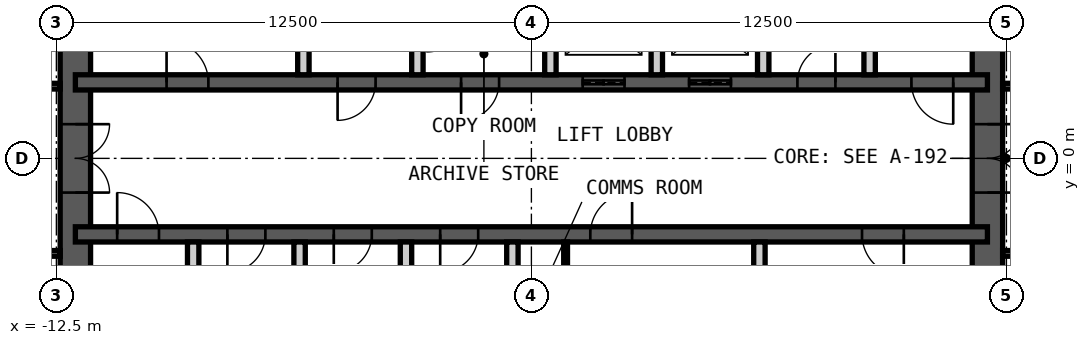
"""IFC4 building model, lengths in metres.
Left out: names, types, materials, properties, quantities, classifications, styles, units other than length and angle.
Written with IfcOpenShell. Run it as: python <this file> out.ifc"""

import sys

from ifc_helpers import new_model, si_unit, direction, frame, frame_2d, origin, place, context, subcontext, project, spatial, rectangle, extrude, element, fill, save


model = new_model("IFC4")
c1 = context("Model", 3, precision=1e-05, world=origin(), true_north=direction((0.0, 1.0)))
c2 = subcontext(c1, "Body", "Model", "MODEL_VIEW")
j1 = project(units=[si_unit("LENGTHUNIT", "METRE"), si_unit("PLANEANGLEUNIT", "RADIAN")], contexts=[c1])
p1 = place(None, origin())
s1 = spatial("IfcSite", under=j1, at=p1, CompositionType="ELEMENT")
p2 = place(p1, origin())
s2 = spatial("IfcBuilding", under=s1, at=p2, CompositionType="ELEMENT")
p3 = place(p2, frame((0.0, 0.0, 312.4)))
s3 = spatial("IfcBuildingStorey", under=s2, at=p3, CompositionType="ELEMENT", Elevation=312.4)
p4 = place(p3, frame((12.0, -9.0, 0.0), z_axis=(0.0, 0.0, 1.0), x_axis=(0.0, 1.0, 0.0)))
e1 = element("IfcWall", 1, at=p4, inside=s3, PredefinedType="SHEAR", context=c2, shape_type="SweptSolid", body=[
    extrude(rectangle(XDim=18.0, YDim=0.8, at=frame_2d((9.0, 0.0))), origin(), (0.0, 0.0, 1.0), 4.2),
])
p5 = place(p4, frame((8.1, 0.0, 0.0)))
e2 = element("IfcOpeningElement", 2, at=p5, cuts=e1, PredefinedType="OPENING", context=c2, shape_type="SweptSolid", body=[
    extrude(rectangle(XDim=1.8, YDim=2.1, at=frame_2d((0.9, 1.05))), frame((0.0, 0.41, 0.0), z_axis=(0.0, -1.0, 0.0), x_axis=(1.0, 0.0, 0.0)), (0.0, 0.0, 1.0), 0.82),
])
p6 = place(p3, frame((-12.0, -9.0, 0.0), z_axis=(0.0, 0.0, 1.0), x_axis=(0.0, 1.0, 0.0)))
e3 = element("IfcWall", 3, at=p6, inside=s3, PredefinedType="SHEAR", context=c2, shape_type="SweptSolid", body=[
    extrude(rectangle(XDim=18.0, YDim=0.8, at=frame_2d((9.0, 0.0))), origin(), (0.0, 0.0, 1.0), 4.2),
])
p7 = place(p6, frame((8.1, 0.0, 0.0)))
e4 = element("IfcOpeningElement", 4, at=p7, cuts=e3, PredefinedType="OPENING", context=c2, shape_type="SweptSolid", body=[
    extrude(rectangle(XDim=1.8, YDim=2.1, at=frame_2d((0.9, 1.05))), frame((0.0, 0.41, 0.0), z_axis=(0.0, -1.0, 0.0), x_axis=(1.0, 0.0, 0.0)), (0.0, 0.0, 1.0), 0.82),
])
p8 = place(p3, frame((-12.0, 2.0, 0.0), z_axis=(0.0, 0.0, 1.0), x_axis=(1.0, 0.0, 0.0)))
e5 = element("IfcWall", 5, at=p8, inside=s3, PredefinedType="SHEAR", context=c2, shape_type="SweptSolid", body=[
    extrude(rectangle(XDim=24.0, YDim=0.4, at=frame_2d((12.0, 0.0))), origin(), (0.0, 0.0, 1.0), 4.2),
])
p9 = place(p8, frame((2.4, 0.0, 0.0)))
e6 = element("IfcOpeningElement", 6, at=p9, cuts=e5, PredefinedType="OPENING", context=c2, shape_type="SweptSolid", body=[
    extrude(rectangle(XDim=1.1, YDim=2.1, at=frame_2d((0.55, 1.05))), frame((0.0, 0.21, 0.0), z_axis=(0.0, -1.0, 0.0), x_axis=(1.0, 0.0, 0.0)), (0.0, 0.0, 1.0), 0.42),
])
p10 = place(p8, frame((22.0, 0.0, 0.0)))
e7 = element("IfcOpeningElement", 7, at=p10, cuts=e5, PredefinedType="OPENING", context=c2, shape_type="SweptSolid", body=[
    extrude(rectangle(XDim=1.1, YDim=2.1, at=frame_2d((0.55, 1.05))), frame((0.0, 0.21, 0.0), z_axis=(0.0, -1.0, 0.0), x_axis=(1.0, 0.0, 0.0)), (0.0, 0.0, 1.0), 0.42),
])
p11 = place(p8, frame((10.15, 0.0, 0.0)))
e8 = element("IfcOpeningElement", 8, at=p11, cuts=e5, PredefinedType="OPENING", context=c2, shape_type="SweptSolid", body=[
    extrude(rectangle(XDim=1.0, YDim=2.1, at=frame_2d((0.5, 1.05))), frame((0.0, 0.21, 0.0), z_axis=(0.0, -1.0, 0.0), x_axis=(1.0, 0.0, 0.0)), (0.0, 0.0, 1.0), 0.42),
])
p12 = place(p8, frame((6.9, 0.0, 0.0)))
e9 = element("IfcOpeningElement", 9, at=p12, cuts=e5, PredefinedType="OPENING", context=c2, shape_type="SweptSolid", body=[
    extrude(rectangle(XDim=1.0, YDim=2.1, at=frame_2d((0.5, 1.05))), frame((0.0, 0.21, 0.0), z_axis=(0.0, -1.0, 0.0), x_axis=(1.0, 0.0, 0.0)), (0.0, 0.0, 1.0), 0.42),
])
p13 = place(p8, frame((13.35, 0.0, 0.0)))
e10 = element("IfcOpeningElement", 10, at=p13, cuts=e5, PredefinedType="OPENING", context=c2, shape_type="SweptSolid", body=[
    extrude(rectangle(XDim=1.1, YDim=2.4, at=frame_2d((0.55, 1.2))), frame((0.0, 0.21, 0.0), z_axis=(0.0, -1.0, 0.0), x_axis=(1.0, 0.0, 0.0)), (0.0, 0.0, 1.0), 0.42),
])
p14 = place(p8, frame((16.15, 0.0, 0.0)))
e11 = element("IfcOpeningElement", 11, at=p14, cuts=e5, PredefinedType="OPENING", context=c2, shape_type="SweptSolid", body=[
    extrude(rectangle(XDim=1.1, YDim=2.4, at=frame_2d((0.55, 1.2))), frame((0.0, 0.21, 0.0), z_axis=(0.0, -1.0, 0.0), x_axis=(1.0, 0.0, 0.0)), (0.0, 0.0, 1.0), 0.42),
])
p15 = place(p8, frame((19.0, 0.0, 0.0)))
e12 = element("IfcOpeningElement", 12, at=p15, cuts=e5, PredefinedType="OPENING", context=c2, shape_type="SweptSolid", body=[
    extrude(rectangle(XDim=1.0, YDim=2.1, at=frame_2d((0.5, 1.05))), frame((0.0, 0.21, 0.0), z_axis=(0.0, -1.0, 0.0), x_axis=(1.0, 0.0, 0.0)), (0.0, 0.0, 1.0), 0.42),
])
p16 = place(p3, frame((-12.0, -2.0, 0.0), z_axis=(0.0, 0.0, 1.0), x_axis=(1.0, 0.0, 0.0)))
e13 = element("IfcWall", 13, at=p16, inside=s3, PredefinedType="SHEAR", context=c2, shape_type="SweptSolid", body=[
    extrude(rectangle(XDim=24.0, YDim=0.4, at=frame_2d((12.0, 0.0))), origin(), (0.0, 0.0, 1.0), 4.2),
])
p17 = place(p16, frame((1.1, 0.0, 0.0)))
e14 = element("IfcOpeningElement", 14, at=p17, cuts=e13, PredefinedType="OPENING", context=c2, shape_type="SweptSolid", body=[
    extrude(rectangle(XDim=1.1, YDim=2.1, at=frame_2d((0.55, 1.05))), frame((0.0, 0.21, 0.0), z_axis=(0.0, -1.0, 0.0), x_axis=(1.0, 0.0, 0.0)), (0.0, 0.0, 1.0), 0.42),
])
p18 = place(p16, frame((13.55, 0.0, 0.0)))
e15 = element("IfcOpeningElement", 15, at=p18, cuts=e13, PredefinedType="OPENING", context=c2, shape_type="SweptSolid", body=[
    extrude(rectangle(XDim=1.1, YDim=2.1, at=frame_2d((0.55, 1.05))), frame((0.0, 0.21, 0.0), z_axis=(0.0, -1.0, 0.0), x_axis=(1.0, 0.0, 0.0)), (0.0, 0.0, 1.0), 0.42),
])
p19 = place(p16, frame((20.7, 0.0, 0.0)))
e16 = element("IfcOpeningElement", 16, at=p19, cuts=e13, PredefinedType="OPENING", context=c2, shape_type="SweptSolid", body=[
    extrude(rectangle(XDim=1.1, YDim=2.1, at=frame_2d((0.55, 1.05))), frame((0.0, 0.21, 0.0), z_axis=(0.0, -1.0, 0.0), x_axis=(1.0, 0.0, 0.0)), (0.0, 0.0, 1.0), 0.42),
])
p20 = place(p16, frame((4.0, 0.0, 0.0)))
e17 = element("IfcOpeningElement", 17, at=p20, cuts=e13, PredefinedType="OPENING", context=c2, shape_type="SweptSolid", body=[
    extrude(rectangle(XDim=1.0, YDim=2.1, at=frame_2d((0.5, 1.05))), frame((0.0, 0.21, 0.0), z_axis=(0.0, -1.0, 0.0), x_axis=(1.0, 0.0, 0.0)), (0.0, 0.0, 1.0), 0.42),
])
p21 = place(p16, frame((6.8, 0.0, 0.0)))
e18 = element("IfcOpeningElement", 18, at=p21, cuts=e13, PredefinedType="OPENING", context=c2, shape_type="SweptSolid", body=[
    extrude(rectangle(XDim=1.0, YDim=2.1, at=frame_2d((0.5, 1.05))), frame((0.0, 0.21, 0.0), z_axis=(0.0, -1.0, 0.0), x_axis=(1.0, 0.0, 0.0)), (0.0, 0.0, 1.0), 0.42),
])
p22 = place(p16, frame((9.6, 0.0, 0.0)))
e19 = element("IfcOpeningElement", 19, at=p22, cuts=e13, PredefinedType="OPENING", context=c2, shape_type="SweptSolid", body=[
    extrude(rectangle(XDim=1.0, YDim=2.1, at=frame_2d((0.5, 1.05))), frame((0.0, 0.21, 0.0), z_axis=(0.0, -1.0, 0.0), x_axis=(1.0, 0.0, 0.0)), (0.0, 0.0, 1.0), 0.42),
])
for number, where, z_axis, x_axis in (
    (20, (-6.0, 2.2, 0.0), (0.0, 0.0, 1.0), (0.0, 1.0, 0.0)),
    (21, (-3.0, 2.2, 0.0), (0.0, 0.0, 1.0), (0.0, 1.0, 0.0)),
    (22, (0.5, 2.2, 0.0), (0.0, 0.0, 1.0), (0.0, 1.0, 0.0)),
    (23, (3.3, 2.2, 0.0), (0.0, 0.0, 1.0), (0.0, 1.0, 0.0)),
    (24, (6.1, 2.2, 0.0), (0.0, 0.0, 1.0), (0.0, 1.0, 0.0)),
    (25, (8.9, 2.2, 0.0), (0.0, 0.0, 1.0), (0.0, 1.0, 0.0)),
    (26, (-8.9, -4.85, 0.0), (0.0, 0.0, 1.0), (0.0, 1.0, 0.0)),
    (27, (-6.1, -4.85, 0.0), (0.0, 0.0, 1.0), (0.0, 1.0, 0.0)),
    (28, (-3.3, -4.85, 0.0), (0.0, 0.0, 1.0), (0.0, 1.0, 0.0)),
    (29, (-0.5, -4.85, 0.0), (0.0, 0.0, 1.0), (0.0, 1.0, 0.0)),
    (30, (6.0, -4.85, 0.0), (0.0, 0.0, 1.0), (0.0, 1.0, 0.0)),
):
    element("IfcWall", number, at=place(p3, frame(where, z_axis=z_axis, x_axis=x_axis)), inside=s3, PredefinedType="PARTITIONING", context=c2, shape_type="SweptSolid", body=[
        extrude(rectangle(XDim=2.65, YDim=0.3, at=frame_2d((1.325, 0.0))), origin(), (0.0, 0.0, 1.0), 3.98),
    ])
p23 = place(p3, frame((0.9, -4.85, 0.0), z_axis=(0.0, 0.0, 1.0), x_axis=(0.0, 1.0, 0.0)))
e31 = element("IfcWall", 31, at=p23, inside=s3, PredefinedType="PARTITIONING", context=c2, shape_type="SweptSolid", body=[
    extrude(rectangle(XDim=2.65, YDim=0.1, at=frame_2d((1.325, 0.0))), origin(), (0.0, 0.0, 1.0), 3.98),
])
p24 = place(p23, frame((0.1, 0.0, 0.0)))
e32 = element("IfcOpeningElement", 32, at=p24, cuts=e31, PredefinedType="OPENING", context=c2, shape_type="SweptSolid", body=[
    extrude(rectangle(XDim=1.0, YDim=2.4, at=frame_2d((0.5, 1.2))), frame((0.0, 0.06, 0.0), z_axis=(0.0, -1.0, 0.0), x_axis=(1.0, 0.0, 0.0)), (0.0, 0.0, 1.0), 0.12),
])
p25 = place(p3, frame((12.4, 1.9, 0.0), z_axis=(0.0, 0.0, 1.0), x_axis=(1.0, 0.0, 0.0)))
e33 = element("IfcWall", 33, at=p25, inside=s3, PredefinedType="PARTITIONING", context=c2, shape_type="SweptSolid", body=[
    extrude(rectangle(XDim=2.2, YDim=0.15, at=frame_2d((1.1, 0.0))), origin(), (0.0, 0.0, 1.0), 2.93),
])
p26 = place(p3, frame((12.4, -2.5, 0.0), z_axis=(0.0, 0.0, 1.0), x_axis=(1.0, 0.0, 0.0)))
e34 = element("IfcWall", 34, at=p26, inside=s3, PredefinedType="PARTITIONING", context=c2, shape_type="SweptSolid", body=[
    extrude(rectangle(XDim=2.2, YDim=0.15, at=frame_2d((1.1, 0.0))), origin(), (0.0, 0.0, 1.0), 3.33),
])
for number, where, z_axis, x_axis in (
    (35, (-12.4, 1.9, 0.0), (0.0, 0.0, 1.0), (-1.0, 0.0, 0.0)),
    (36, (-12.4, -2.5, 0.0), (0.0, 0.0, 1.0), (-1.0, 0.0, 0.0)),
):
    element("IfcWall", number, at=place(p3, frame(where, z_axis=z_axis, x_axis=x_axis)), inside=s3, PredefinedType="PARTITIONING", context=c2, shape_type="SweptSolid", body=[
        extrude(rectangle(XDim=2.2, YDim=0.15, at=frame_2d((1.1, 0.0))), origin(), (0.0, 0.0, 1.0), 3.53),
    ])
p27 = place(p9, origin())
e37 = element("IfcDoor", 37, at=p27, inside=s3, OperationType="SINGLE_SWING_RIGHT", PredefinedType="DOOR", context=c2, shape_type="SweptSolid", body=[
    extrude(rectangle(XDim=1.1, YDim=2.1, at=frame_2d((0.55, 1.05))), frame((0.0, 0.025, 0.0), z_axis=(0.0, -1.0, 0.0), x_axis=(1.0, 0.0, 0.0)), (0.0, 0.0, 1.0), 0.05),
])
fill(e6, e37)
p28 = place(p17, origin())
e38 = element("IfcDoor", 38, at=p28, inside=s3, OperationType="SINGLE_SWING_RIGHT", PredefinedType="DOOR", context=c2, shape_type="SweptSolid", body=[
    extrude(rectangle(XDim=1.1, YDim=2.1, at=frame_2d((0.55, 1.05))), frame((0.0, 0.025, 0.0), z_axis=(0.0, -1.0, 0.0), x_axis=(1.0, 0.0, 0.0)), (0.0, 0.0, 1.0), 0.05),
])
fill(e14, e38)
p29 = place(p10, origin())
e39 = element("IfcDoor", 39, at=p29, inside=s3, OperationType="SINGLE_SWING_RIGHT", PredefinedType="DOOR", context=c2, shape_type="SweptSolid", body=[
    extrude(rectangle(XDim=1.1, YDim=2.1, at=frame_2d((0.55, 1.05))), frame((0.0, 0.025, 0.0), z_axis=(0.0, -1.0, 0.0), x_axis=(1.0, 0.0, 0.0)), (0.0, 0.0, 1.0), 0.05),
])
fill(e7, e39)
p30 = place(p11, origin())
e40 = element("IfcDoor", 40, at=p30, inside=s3, OperationType="SINGLE_SWING_LEFT", PredefinedType="DOOR", context=c2, shape_type="SweptSolid", body=[
    extrude(rectangle(XDim=1.0, YDim=2.1, at=frame_2d((0.5, 1.05))), frame((0.0, 0.025, 0.0), z_axis=(0.0, -1.0, 0.0), x_axis=(1.0, 0.0, 0.0)), (0.0, 0.0, 1.0), 0.05),
])
fill(e8, e40)
p31 = place(p18, origin())
e41 = element("IfcDoor", 41, at=p31, inside=s3, OperationType="SINGLE_SWING_LEFT", PredefinedType="DOOR", context=c2, shape_type="SweptSolid", body=[
    extrude(rectangle(XDim=1.1, YDim=2.1, at=frame_2d((0.55, 1.05))), frame((0.0, 0.025, 0.0), z_axis=(0.0, -1.0, 0.0), x_axis=(1.0, 0.0, 0.0)), (0.0, 0.0, 1.0), 0.05),
])
fill(e15, e41)
p32 = place(p19, origin())
e42 = element("IfcDoor", 42, at=p32, inside=s3, OperationType="SINGLE_SWING_RIGHT", PredefinedType="DOOR", context=c2, shape_type="SweptSolid", body=[
    extrude(rectangle(XDim=1.1, YDim=2.1, at=frame_2d((0.55, 1.05))), frame((0.0, 0.025, 0.0), z_axis=(0.0, -1.0, 0.0), x_axis=(1.0, 0.0, 0.0)), (0.0, 0.0, 1.0), 0.05),
])
fill(e16, e42)
p33 = place(p5, origin())
e43 = element("IfcDoor", 43, at=p33, inside=s3, OperationType="DOUBLE_DOOR_DOUBLE_SWING", PredefinedType="DOOR", context=c2, shape_type="SweptSolid", body=[
    extrude(rectangle(XDim=1.8, YDim=2.1, at=frame_2d((0.9, 1.05))), frame((0.0, 0.025, 0.0), z_axis=(0.0, -1.0, 0.0), x_axis=(1.0, 0.0, 0.0)), (0.0, 0.0, 1.0), 0.05),
])
fill(e2, e43)
p34 = place(p7, origin())
e44 = element("IfcDoor", 44, at=p34, inside=s3, OperationType="DOUBLE_DOOR_DOUBLE_SWING", PredefinedType="DOOR", context=c2, shape_type="SweptSolid", body=[
    extrude(rectangle(XDim=1.8, YDim=2.1, at=frame_2d((0.9, 1.05))), frame((0.0, 0.025, 0.0), z_axis=(0.0, -1.0, 0.0), x_axis=(1.0, 0.0, 0.0)), (0.0, 0.0, 1.0), 0.05),
])
fill(e4, e44)
p35 = place(p12, origin())
e45 = element("IfcDoor", 45, at=p35, inside=s3, OperationType="SINGLE_SWING_LEFT", PredefinedType="DOOR", context=c2, shape_type="SweptSolid", body=[
    extrude(rectangle(XDim=1.0, YDim=2.1, at=frame_2d((0.5, 1.05))), frame((0.0, 0.025, 0.0), z_axis=(0.0, -1.0, 0.0), x_axis=(1.0, 0.0, 0.0)), (0.0, 0.0, 1.0), 0.05),
])
fill(e9, e45)
p36 = place(p13, origin())
e46 = element("IfcDoor", 46, at=p36, inside=s3, OperationType="DOUBLE_DOOR_SLIDING", PredefinedType="DOOR", context=c2, shape_type="SweptSolid", body=[
    extrude(rectangle(XDim=1.1, YDim=2.4, at=frame_2d((0.55, 1.2))), frame((0.0, 0.025, 0.0), z_axis=(0.0, -1.0, 0.0), x_axis=(1.0, 0.0, 0.0)), (0.0, 0.0, 1.0), 0.05),
])
fill(e10, e46)
p37 = place(p14, origin())
e47 = element("IfcDoor", 47, at=p37, inside=s3, OperationType="DOUBLE_DOOR_SLIDING", PredefinedType="DOOR", context=c2, shape_type="SweptSolid", body=[
    extrude(rectangle(XDim=1.1, YDim=2.4, at=frame_2d((0.55, 1.2))), frame((0.0, 0.025, 0.0), z_axis=(0.0, -1.0, 0.0), x_axis=(1.0, 0.0, 0.0)), (0.0, 0.0, 1.0), 0.05),
])
fill(e11, e47)
p38 = place(p15, origin())
e48 = element("IfcDoor", 48, at=p38, inside=s3, OperationType="SINGLE_SWING_LEFT", PredefinedType="DOOR", context=c2, shape_type="SweptSolid", body=[
    extrude(rectangle(XDim=1.0, YDim=2.1, at=frame_2d((0.5, 1.05))), frame((0.0, 0.025, 0.0), z_axis=(0.0, -1.0, 0.0), x_axis=(1.0, 0.0, 0.0)), (0.0, 0.0, 1.0), 0.05),
])
fill(e12, e48)
p39 = place(p20, origin())
e49 = element("IfcDoor", 49, at=p39, inside=s3, OperationType="SINGLE_SWING_LEFT", PredefinedType="DOOR", context=c2, shape_type="SweptSolid", body=[
    extrude(rectangle(XDim=1.0, YDim=2.1, at=frame_2d((0.5, 1.05))), frame((0.0, 0.025, 0.0), z_axis=(0.0, -1.0, 0.0), x_axis=(1.0, 0.0, 0.0)), (0.0, 0.0, 1.0), 0.05),
])
fill(e17, e49)
p40 = place(p21, origin())
e50 = element("IfcDoor", 50, at=p40, inside=s3, OperationType="SINGLE_SWING_LEFT", PredefinedType="DOOR", context=c2, shape_type="SweptSolid", body=[
    extrude(rectangle(XDim=1.0, YDim=2.1, at=frame_2d((0.5, 1.05))), frame((0.0, 0.025, 0.0), z_axis=(0.0, -1.0, 0.0), x_axis=(1.0, 0.0, 0.0)), (0.0, 0.0, 1.0), 0.05),
])
fill(e18, e50)
p41 = place(p22, origin())
e51 = element("IfcDoor", 51, at=p41, inside=s3, OperationType="SINGLE_SWING_LEFT", PredefinedType="DOOR", context=c2, shape_type="SweptSolid", body=[
    extrude(rectangle(XDim=1.0, YDim=2.1, at=frame_2d((0.5, 1.05))), frame((0.0, 0.025, 0.0), z_axis=(0.0, -1.0, 0.0), x_axis=(1.0, 0.0, 0.0)), (0.0, 0.0, 1.0), 0.05),
])
fill(e19, e51)
save(model, sys.argv[1])
